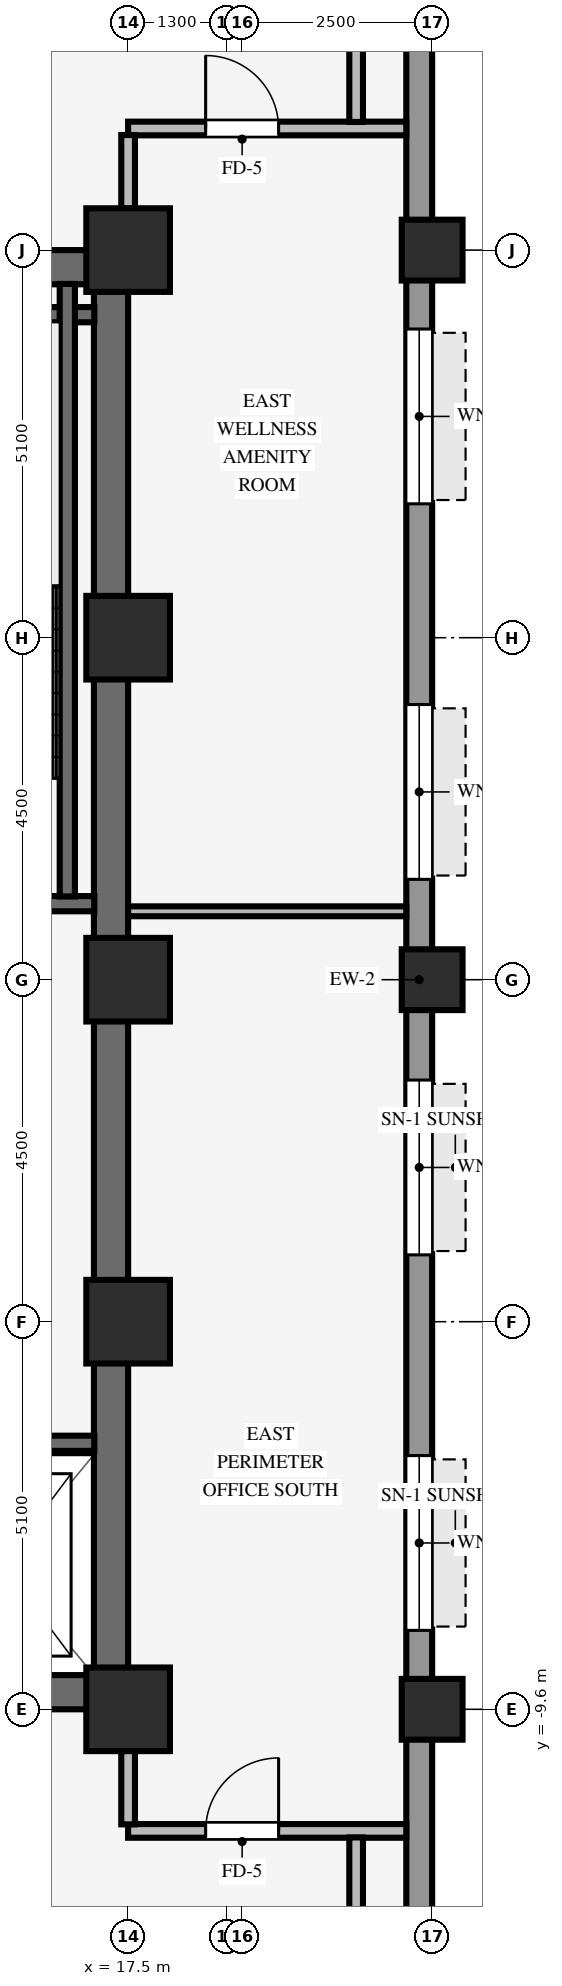
"""IFC4 building model, lengths in metres.
Left out: names, types, materials, properties, quantities, classifications, styles, units other than length and angle.
Written with IfcOpenShell. Run it as: python <this file> out.ifc"""

import sys

from ifc_helpers import new_model, si_unit, direction, frame, frame_2d, origin, origin_2d, place, context, subcontext, project, spatial, rectangle, hollow_rectangle, extrude, source, transform, mapped, element, fill, save


model = new_model("IFC4")
c1 = context("Model", 3, precision=1e-05, world=origin(), true_north=direction((0.0, 1.0)))
c2 = subcontext(c1, "Body", "Model", "MODEL_VIEW")
j1 = project(units=[si_unit("LENGTHUNIT", "METRE"), si_unit("PLANEANGLEUNIT", "RADIAN")], contexts=[c1])
p1 = place(None, origin())
s1 = spatial("IfcSite", under=j1, at=p1, CompositionType="ELEMENT")
p2 = place(p1, origin())
s2 = spatial("IfcBuilding", under=s1, at=p2, CompositionType="ELEMENT")
p3 = place(p2, frame((0.0, 0.0, 67.75)))
s3 = spatial("IfcBuildingStorey", under=s2, at=p3, CompositionType="ELEMENT", Elevation=67.75)
for number, where, z_axis, x_axis in (
    (1, (9.0, -9.375, 0.0), (0.0, 0.0, 1.0), (1.0, 0.0, 0.0)),
    (2, (9.0, 9.375, 0.0), (0.0, 0.0, 1.0), (1.0, 0.0, 0.0)),
):
    element("IfcWall", number, at=place(p3, frame(where, z_axis=z_axis, x_axis=x_axis)), inside=s3, PredefinedType="SHEAR", context=c2, shape_type="SweptSolid", body=[
        extrude(rectangle(XDim=8.5, YDim=0.45, at=frame_2d((4.25, 0.0))), origin(), (0.0, 0.0, 1.0), 3.37),
    ])
p4 = place(p3, frame((17.275, -9.155, 0.0), z_axis=(0.0, 0.0, 1.0), x_axis=(0.0, 1.0, 0.0)))
e3 = element("IfcWall", 3, at=p4, inside=s3, PredefinedType="SHEAR", context=c2, shape_type="SweptSolid", body=[
    extrude(rectangle(XDim=18.31, YDim=0.45, at=frame_2d((9.155, 0.0))), origin(), (0.0, 0.0, 1.0), 3.37),
])
for number, where, z_axis, x_axis in (
    (4, (17.5, -9.6, 0.0), (0.0, 0.0, 1.0), (1.0, 0.0, 0.0)),
    (5, (17.5, -4.5, 0.0), (0.0, 0.0, 1.0), (1.0, 0.0, 0.0)),
    (6, (17.5, 4.5, 0.0), (0.0, 0.0, 1.0), (1.0, 0.0, 0.0)),
    (7, (17.5, 9.6, 0.0), (0.0, 0.0, 1.0), (1.0, 0.0, 0.0)),
    (8, (17.5, 0.0, 0.0), (0.0, 0.0, 1.0), (1.0, 0.0, 0.0)),
):
    element("IfcColumn", number, at=place(p3, frame(where, z_axis=z_axis, x_axis=x_axis)), inside=s3, PredefinedType="COLUMN", context=c2, shape_type="SweptSolid", body=[
        extrude(rectangle(XDim=1.1, YDim=1.1, at=origin_2d()), origin(), (0.0, 0.0, 1.0), 3.37),
    ])
for number, where, z_axis, x_axis in (
    (9, (21.5, -9.6, 0.0), (0.0, 0.0, 1.0), (1.0, 0.0, 0.0)),
    (10, (21.5, 0.0, 0.0), (0.0, 0.0, 1.0), (1.0, 0.0, 0.0)),
    (11, (21.5, 9.6, 0.0), (0.0, 0.0, 1.0), (1.0, 0.0, 0.0)),
):
    element("IfcColumn", number, at=place(p3, frame(where, z_axis=z_axis, x_axis=x_axis)), inside=s3, PredefinedType="COLUMN", context=c2, shape_type="SweptSolid", body=[
        extrude(hollow_rectangle(XDim=0.8, YDim=0.8, WallThickness=0.055, InnerFilletRadius=0.055, OuterFilletRadius=0.11, at=origin_2d()), origin(), (0.0, 0.0, 1.0), 3.37),
    ])
p5 = place(p3, frame((21.33, -20.764, 0.0), z_axis=(0.0, 0.0, 1.0), x_axis=(0.0, 1.0, 0.0)))
e12 = element("IfcWall", 12, at=p5, inside=s3, PredefinedType="STANDARD", context=c2, shape_type="SweptSolid", body=[
    extrude(rectangle(XDim=41.528, YDim=0.34, at=frame_2d((20.764, 0.0))), origin(), (0.0, 0.0, 1.0), 2.705),
])
p6 = place(p5, frame((12.202, 0.0, 0.8)))
e13 = element("IfcOpeningElement", 13, at=p6, cuts=e12, PredefinedType="OPENING", context=c2, shape_type="SweptSolid", body=[
    extrude(rectangle(XDim=2.3, YDim=1.62, at=frame_2d((1.15, 0.81))), frame((0.0, 0.18, 0.0), z_axis=(0.0, -1.0, 0.0), x_axis=(1.0, 0.0, 0.0)), (0.0, 0.0, 1.0), 0.36),
])
p7 = place(p5, frame((17.144, 0.0, 0.8)))
e14 = element("IfcOpeningElement", 14, at=p7, cuts=e12, PredefinedType="OPENING", context=c2, shape_type="SweptSolid", body=[
    extrude(rectangle(XDim=2.3, YDim=1.62, at=frame_2d((1.15, 0.81))), frame((0.0, 0.18, 0.0), z_axis=(0.0, -1.0, 0.0), x_axis=(1.0, 0.0, 0.0)), (0.0, 0.0, 1.0), 0.36),
])
p8 = place(p5, frame((22.084, 0.0, 0.8)))
e15 = element("IfcOpeningElement", 15, at=p8, cuts=e12, PredefinedType="OPENING", context=c2, shape_type="SweptSolid", body=[
    extrude(rectangle(XDim=2.3, YDim=1.62, at=frame_2d((1.15, 0.81))), frame((0.0, 0.18, 0.0), z_axis=(0.0, -1.0, 0.0), x_axis=(1.0, 0.0, 0.0)), (0.0, 0.0, 1.0), 0.36),
])
p9 = place(p5, frame((27.025, 0.0, 0.8)))
e16 = element("IfcOpeningElement", 16, at=p9, cuts=e12, PredefinedType="OPENING", context=c2, shape_type="SweptSolid", body=[
    extrude(rectangle(XDim=2.3, YDim=1.62, at=frame_2d((1.15, 0.81))), frame((0.0, 0.18, 0.0), z_axis=(0.0, -1.0, 0.0), x_axis=(1.0, 0.0, 0.0)), (0.0, 0.0, 1.0), 0.36),
])
for number, where, z_axis, x_axis in (
    (17, (13.535, 1.0, 0.0), (0.0, 0.0, 1.0), (1.0, 0.0, 0.0)),
    (18, (13.535, 8.75, 0.0), (0.0, 0.0, 1.0), (1.0, 0.0, 0.0)),
):
    element("IfcWall", number, at=place(p3, frame(where, z_axis=z_axis, x_axis=x_axis)), inside=s3, PredefinedType="SHEAR", context=c2, shape_type="SweptSolid", body=[
        extrude(rectangle(XDim=3.52, YDim=0.2, at=frame_2d((1.76, 0.0))), origin(), (0.0, 0.0, 1.0), 3.37),
    ])
p10 = place(p3, frame((16.7, 1.095, 0.0), z_axis=(0.0, 0.0, 1.0), x_axis=(0.0, 1.0, 0.0)))
e19 = element("IfcWall", 19, at=p10, inside=s3, PredefinedType="SHEAR", context=c2, shape_type="SweptSolid", body=[
    extrude(rectangle(XDim=8.06, YDim=0.2, at=frame_2d((4.03, 0.0))), origin(), (0.0, 0.0, 1.0), 3.37),
])
p11 = place(p3, frame((14.645, -6.1, 0.0), z_axis=(0.0, 0.0, 1.0), x_axis=(1.0, 0.0, 0.0)))
e20 = element("IfcWall", 20, at=p11, inside=s3, PredefinedType="SHEAR", context=c2, shape_type="SweptSolid", body=[
    extrude(rectangle(XDim=2.41, YDim=0.2, at=frame_2d((1.205, 0.0))), origin(), (0.0, 0.0, 1.0), 3.37),
])
p12 = place(p3, frame((17.5, -11.2, 0.0), z_axis=(0.0, 0.0, 1.0), x_axis=(1.0, 0.0, 0.0)))
e21 = element("IfcWall", 21, at=p12, inside=s3, PredefinedType="PARTITIONING", context=c2, shape_type="SweptSolid", body=[
    extrude(rectangle(XDim=3.66, YDim=0.18, at=frame_2d((1.83, 0.0))), origin(), (0.0, 0.0, 1.0), 3.36),
])
p13 = place(p12, frame((1.02, 0.0, 0.0)))
e22 = element("IfcOpeningElement", 22, at=p13, cuts=e21, PredefinedType="OPENING", context=c2, shape_type="SweptSolid", body=[
    extrude(rectangle(XDim=0.96, YDim=2.1, at=frame_2d((0.48, 1.05))), frame((0.0, 0.1, 0.0), z_axis=(0.0, -1.0, 0.0), x_axis=(1.0, 0.0, 0.0)), (0.0, 0.0, 1.0), 0.2),
])
p14 = place(p3, frame((17.5, 0.9, 0.0), z_axis=(0.0, 0.0, 1.0), x_axis=(1.0, 0.0, 0.0)))
e23 = element("IfcWall", 23, at=p14, inside=s3, PredefinedType="PARTITIONING", context=c2, shape_type="SweptSolid", body=[
    extrude(rectangle(XDim=3.66, YDim=0.13, at=frame_2d((1.83, 0.0))), origin(), (0.0, 0.0, 1.0), 3.36),
])
p15 = place(p3, frame((17.5, 11.2, 0.0), z_axis=(0.0, 0.0, 1.0), x_axis=(1.0, 0.0, 0.0)))
e24 = element("IfcWall", 24, at=p15, inside=s3, PredefinedType="PARTITIONING", context=c2, shape_type="SweptSolid", body=[
    extrude(rectangle(XDim=3.66, YDim=0.18, at=frame_2d((1.83, 0.0))), origin(), (0.0, 0.0, 1.0), 3.36),
])
p16 = place(p15, frame((1.02, 0.0, 0.0)))
e25 = element("IfcOpeningElement", 25, at=p16, cuts=e24, PredefinedType="OPENING", context=c2, shape_type="SweptSolid", body=[
    extrude(rectangle(XDim=0.96, YDim=2.1, at=frame_2d((0.48, 1.05))), frame((0.0, 0.1, 0.0), z_axis=(0.0, -1.0, 0.0), x_axis=(1.0, 0.0, 0.0)), (0.0, 0.0, 1.0), 0.2),
])
for number, where, z_axis, x_axis in (
    (26, (17.5, -11.114, 0.0), (0.0, 0.0, 1.0), (0.0, 1.0, 0.0)),
    (27, (17.5, 10.146, 0.0), (0.0, 0.0, 1.0), (0.0, 1.0, 0.0)),
):
    element("IfcWall", number, at=place(p3, frame(where, z_axis=z_axis, x_axis=x_axis)), inside=s3, PredefinedType="PARTITIONING", context=c2, shape_type="SweptSolid", body=[
        extrude(rectangle(XDim=0.968, YDim=0.18, at=frame_2d((0.484, 0.0))), origin(), (0.0, 0.0, 1.0), 2.738),
    ])
for number, where, z_axis, x_axis in (
    (28, (20.5, -13.514, 0.0), (0.0, 0.0, 1.0), (0.0, 1.0, 0.0)),
    (29, (20.5, 11.286, 0.0), (0.0, 0.0, 1.0), (0.0, 1.0, 0.0)),
):
    element("IfcWall", number, at=place(p3, frame(where, z_axis=z_axis, x_axis=x_axis)), inside=s3, PredefinedType="PARTITIONING", context=c2, shape_type="SweptSolid", body=[
        extrude(rectangle(XDim=2.228, YDim=0.18, at=frame_2d((1.114, 0.0))), origin(), (0.0, 0.0, 1.0), 3.36),
    ])
m1 = source(origin(), c2, "Body", "SweptSolid", [
    extrude(rectangle(XDim=2.3, YDim=1.62, at=frame_2d((1.15, 0.81))), frame((0.0, 0.03, 0.0), z_axis=(0.0, -1.0, 0.0), x_axis=(1.0, 0.0, 0.0)), (0.0, 0.0, 1.0), 0.06),
])
p17 = place(p6, origin())
e30 = element("IfcWindow", 30, at=p17, inside=s3, PartitioningType="SINGLE_PANEL", PredefinedType="WINDOW", context=c2, shape_type="MappedRepresentation", body=[
    mapped(m1, transform((0.0, 0.0, 0.0), scale=1.0)),
])
fill(e13, e30)
p18 = place(p7, origin())
e31 = element("IfcWindow", 31, at=p18, inside=s3, PartitioningType="SINGLE_PANEL", PredefinedType="WINDOW", context=c2, shape_type="MappedRepresentation", body=[
    mapped(m1, transform((0.0, 0.0, 0.0), scale=1.0)),
])
fill(e14, e31)
p19 = place(p8, origin())
e32 = element("IfcWindow", 32, at=p19, inside=s3, PartitioningType="SINGLE_PANEL", PredefinedType="WINDOW", context=c2, shape_type="MappedRepresentation", body=[
    mapped(m1, transform((0.0, 0.0, 0.0), scale=1.0)),
])
fill(e15, e32)
p20 = place(p9, origin())
e33 = element("IfcWindow", 33, at=p20, inside=s3, PartitioningType="SINGLE_PANEL", PredefinedType="WINDOW", context=c2, shape_type="MappedRepresentation", body=[
    mapped(m1, transform((0.0, 0.0, 0.0), scale=1.0)),
])
fill(e16, e33)
m2 = source(origin(), c2, "Body", "SweptSolid", [
    extrude(rectangle(XDim=0.96, YDim=2.1, at=frame_2d((0.48, 1.05))), frame((0.0, 0.025, 0.0), z_axis=(0.0, -1.0, 0.0), x_axis=(1.0, 0.0, 0.0)), (0.0, 0.0, 1.0), 0.05),
])
p21 = place(p13, origin())
e34 = element("IfcDoor", 34, at=p21, inside=s3, OperationType="SINGLE_SWING_RIGHT", PredefinedType="DOOR", context=c2, shape_type="MappedRepresentation", body=[
    mapped(m2, transform((0.0, 0.0, 0.0), scale=1.0)),
])
fill(e22, e34)
p22 = place(p16, origin())
e35 = element("IfcDoor", 35, at=p22, inside=s3, OperationType="SINGLE_SWING_LEFT", PredefinedType="DOOR", context=c2, shape_type="MappedRepresentation", body=[
    mapped(m2, transform((0.0, 0.0, 0.0), scale=1.0)),
])
fill(e25, e35)
save(model, sys.argv[1])
